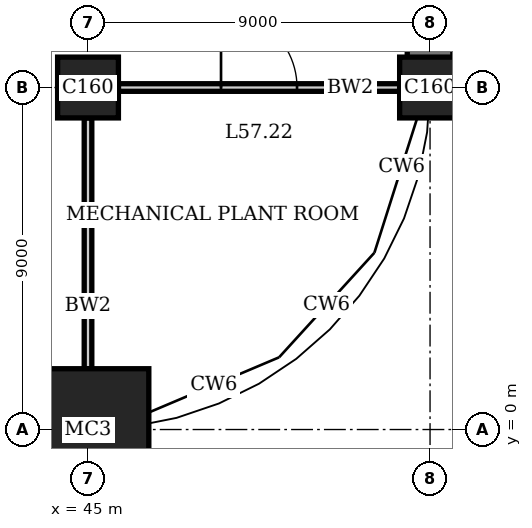
"""IFC4 building model, lengths in metres.
Left out: names, types, materials, properties, quantities, classifications, styles, units other than length and angle.
Written with IfcOpenShell. Run it as: python <this file> out.ifc"""

import sys

from ifc_helpers import new_model, si_unit, direction, frame, frame_2d, origin, origin_2d, place, context, subcontext, project, spatial, rectangle, extrude, element, fill, save


model = new_model("IFC4")
c1 = context("Model", 3, precision=1e-05, world=origin(), true_north=direction((0.0, 1.0)))
c2 = subcontext(c1, "Body", "Model", "MODEL_VIEW")
j1 = project(units=[si_unit("LENGTHUNIT", "METRE"), si_unit("PLANEANGLEUNIT", "RADIAN")], contexts=[c1])
p1 = place(None, origin())
s1 = spatial("IfcSite", under=j1, at=p1, CompositionType="ELEMENT")
p2 = place(p1, origin())
s2 = spatial("IfcBuilding", under=s1, at=p2, CompositionType="ELEMENT")
p3 = place(p2, frame((0.0, 0.0, 234.4)))
s3 = spatial("IfcBuildingStorey", under=s2, at=p3, CompositionType="ELEMENT", Elevation=234.4)
p4 = place(p3, frame((45.0, 0.0, 0.0), z_axis=(0.0, 0.0, 1.0), x_axis=(1.0, 0.0, 0.0)))
e1 = element("IfcColumn", 1, at=p4, inside=s3, PredefinedType="COLUMN", context=c2, shape_type="SweptSolid", body=[
    extrude(rectangle(XDim=3.2, YDim=3.2, at=origin_2d()), origin(), (0.0, 0.0, 1.0), 5.0),
])
for number, where, z_axis, x_axis in (
    (2, (45.0, 9.0, 0.0), (0.0, 0.0, 1.0), (1.0, 0.0, 0.0)),
    (3, (54.0, 9.0, 0.0), (0.0, 0.0, 1.0), (1.0, 0.0, 0.0)),
):
    element("IfcColumn", number, at=place(p3, frame(where, z_axis=z_axis, x_axis=x_axis)), inside=s3, PredefinedType="COLUMN", context=c2, shape_type="SweptSolid", body=[
        extrude(rectangle(XDim=1.6, YDim=1.6, at=origin_2d()), origin(), (0.0, 0.0, 1.0), 5.0),
    ])
p5 = place(p3, frame((54.0, 9.0, 0.0), z_axis=(0.0, 0.0, 1.0), x_axis=(0.0, 1.0, 0.0)))
e4 = element("IfcWall", 4, at=p5, inside=s3, PredefinedType="SHEAR", context=c2, shape_type="SweptSolid", body=[
    extrude(rectangle(XDim=9.0, YDim=1.2, at=frame_2d((4.5, 0.0))), origin(), (0.0, 0.0, 1.0), 5.0),
])
p6 = place(p3, frame((45.0, 1.6, 0.0), z_axis=(0.0, 0.0, 1.0), x_axis=(0.0, 1.0, 0.0)))
e5 = element("IfcWall", 5, at=p6, inside=s3, PredefinedType="SOLIDWALL", context=c2, shape_type="SweptSolid", body=[
    extrude(rectangle(XDim=6.6, YDim=0.2, at=frame_2d((3.3, 0.0))), origin(), (0.0, 0.0, 1.0), 4.0),
])
p7 = place(p3, frame((45.8, 9.0, 0.0), z_axis=(0.0, 0.0, 1.0), x_axis=(1.0, 0.0, 0.0)))
e6 = element("IfcWall", 6, at=p7, inside=s3, PredefinedType="SOLIDWALL", context=c2, shape_type="SweptSolid", body=[
    extrude(rectangle(XDim=7.4, YDim=0.2, at=frame_2d((3.7, 0.0))), origin(), (0.0, 0.0, 1.0), 3.8),
])
p8 = place(p7, frame((2.7, 0.0, 0.0)))
e7 = element("IfcOpeningElement", 7, at=p8, cuts=e6, PredefinedType="OPENING", context=c2, shape_type="SweptSolid", body=[
    extrude(rectangle(XDim=2.0, YDim=2.7, at=frame_2d((1.0, 1.35))), frame((0.0, 0.11, 0.0), z_axis=(0.0, -1.0, 0.0), x_axis=(1.0, 0.0, 0.0)), (0.0, 0.0, 1.0), 0.22),
])
p9 = place(p8, origin())
e8 = element("IfcDoor", 8, at=p9, inside=s3, OperationType="DOUBLE_DOOR_SINGLE_SWING", PredefinedType="DOOR", context=c2, shape_type="SweptSolid", body=[
    extrude(rectangle(XDim=2.0, YDim=2.7, at=frame_2d((1.0, 1.35))), frame((0.0, 0.03, 0.0), z_axis=(0.0, -1.0, 0.0), x_axis=(1.0, 0.0, 0.0)), (0.0, 0.0, 1.0), 0.06),
])
fill(e7, e8)
save(model, sys.argv[1])
